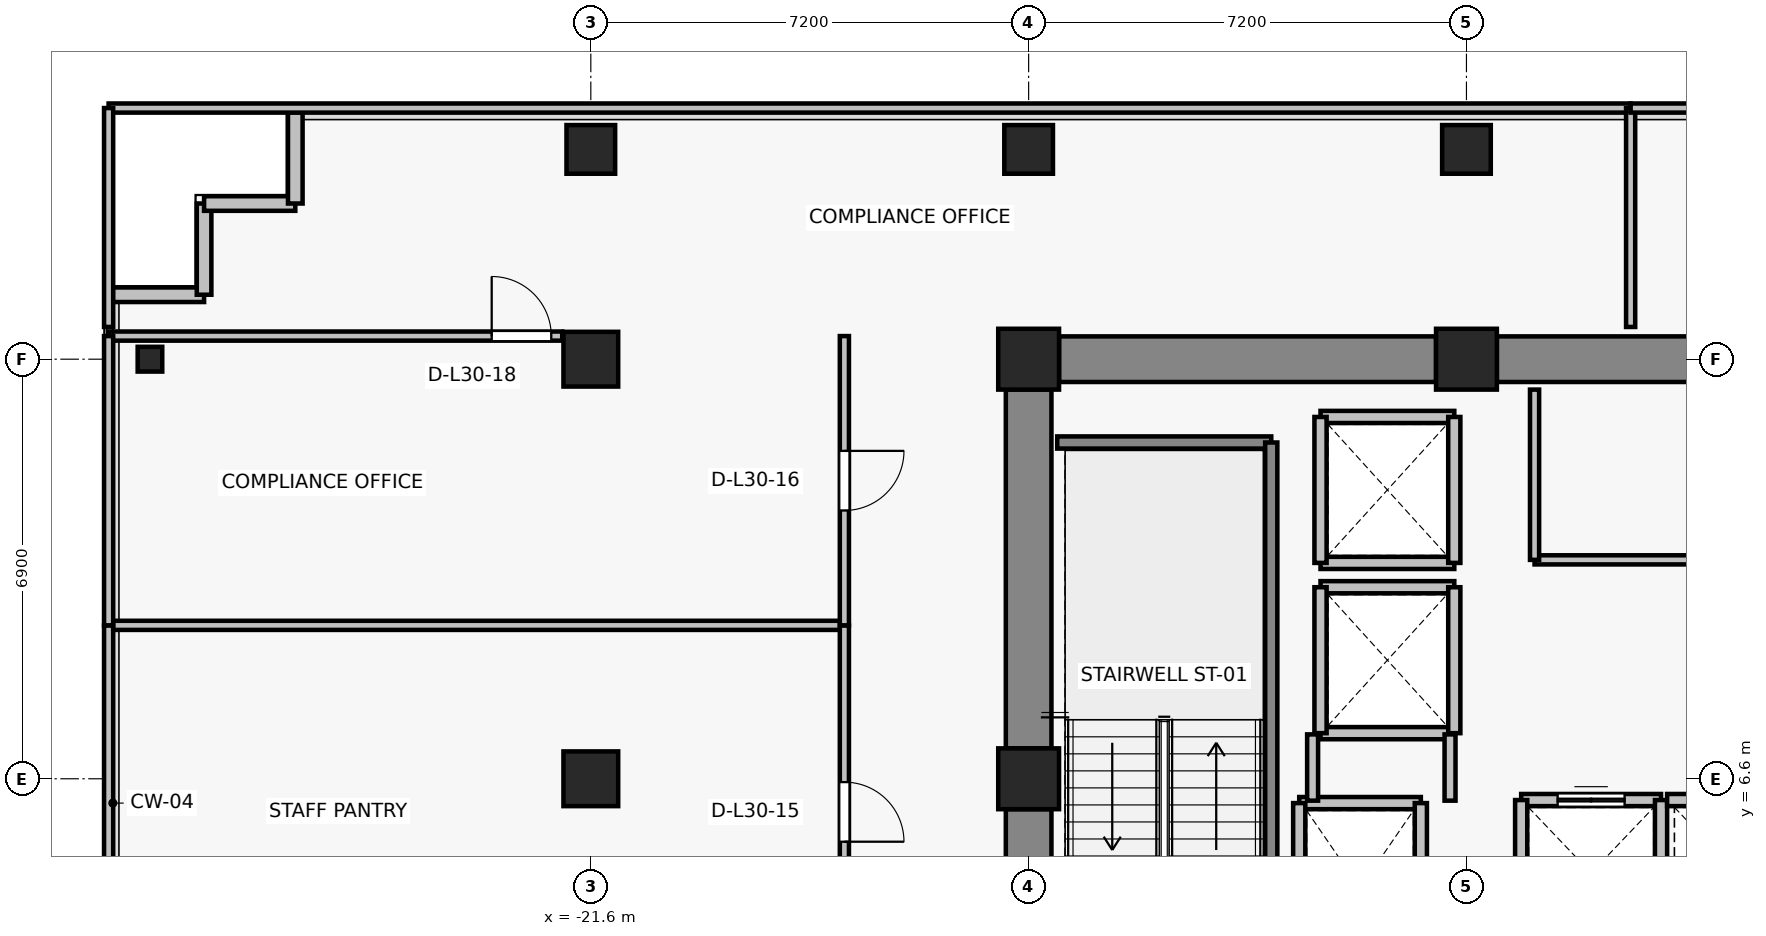
"""IFC4 building model, lengths in metres.
Left out: names, types, materials, properties, quantities, classifications, styles, units other than length and angle.
Written with IfcOpenShell. Run it as: python <this file> out.ifc"""

import sys

from ifc_helpers import new_model, si_unit, direction, frame, frame_2d, origin, origin_2d, place, context, subcontext, project, spatial, rectangle, i_section, extrude, source, transform, mapped, element, fill, save


model = new_model("IFC4")
c1 = context("Model", 3, precision=1e-05, world=origin(), true_north=direction((0.0, 1.0)))
c2 = subcontext(c1, "Body", "Model", "MODEL_VIEW")
j1 = project(units=[si_unit("LENGTHUNIT", "METRE"), si_unit("PLANEANGLEUNIT", "RADIAN")], contexts=[c1])
p1 = place(None, origin())
s1 = spatial("IfcSite", under=j1, at=p1, CompositionType="ELEMENT")
p2 = place(p1, origin())
s2 = spatial("IfcBuilding", under=s1, at=p2, CompositionType="ELEMENT")
p3 = place(p2, frame((0.0, 0.0, 109.9)))
s3 = spatial("IfcBuildingStorey", under=s2, at=p3, CompositionType="ELEMENT", Elevation=109.9)
for number, where, z_axis, x_axis in (
    (1, (-14.4, 6.6, 0.0), (0.0, 0.0, 1.0), (1.0, 0.0, 0.0)),
    (2, (-14.4, 13.5, 0.0), (0.0, 0.0, 1.0), (1.0, 0.0, 0.0)),
    (3, (-7.2, 13.5, 0.0), (0.0, 0.0, 1.0), (1.0, 0.0, 0.0)),
):
    element("IfcColumn", number, at=place(p3, frame(where, z_axis=z_axis, x_axis=x_axis)), inside=s3, PredefinedType="COLUMN", context=c2, shape_type="SweptSolid", body=[
        extrude(rectangle(XDim=1.0, YDim=1.0, at=origin_2d()), origin(), (0.0, 0.0, 1.0), 3.3),
    ])
for number, where, z_axis, x_axis in (
    (4, (-21.6, 6.6, 0.0), (0.0, 0.0, 1.0), (1.0, 0.0, 0.0)),
    (5, (-21.6, 13.5, 0.0), (0.0, 0.0, 1.0), (1.0, 0.0, 0.0)),
):
    element("IfcColumn", number, at=place(p3, frame(where, z_axis=z_axis, x_axis=x_axis)), inside=s3, PredefinedType="COLUMN", context=c2, shape_type="SweptSolid", body=[
        extrude(rectangle(XDim=0.9, YDim=0.9, at=origin_2d()), origin(), (0.0, 0.0, 1.0), 3.3),
    ])
for number, where, z_axis, x_axis in (
    (6, (-14.4, 16.95, 0.0), (0.0, 0.0, 1.0), (1.0, 0.0, 0.0)),
    (7, (-7.2, 16.95, 0.0), (0.0, 0.0, 1.0), (1.0, 0.0, 0.0)),
    (8, (-21.6, 16.95, 0.0), (0.0, 0.0, 1.0), (1.0, 0.0, 0.0)),
):
    element("IfcColumn", number, at=place(p3, frame(where, z_axis=z_axis, x_axis=x_axis)), inside=s3, PredefinedType="COLUMN", context=c2, shape_type="SweptSolid", body=[
        extrude(rectangle(XDim=0.8, YDim=0.8, at=origin_2d()), origin(), (0.0, 0.0, 1.0), 3.3),
    ])
p4 = place(p3, frame((-28.85, 13.5, 0.0), z_axis=(0.0, 0.0, 1.0), x_axis=(1.0, 0.0, 0.0)))
e9 = element("IfcColumn", 9, at=p4, inside=s3, PredefinedType="COLUMN", context=c2, shape_type="SweptSolid", body=[
    extrude(i_section(OverallWidth=0.404, OverallDepth=0.407, WebThickness=0.022, FlangeThickness=0.032, FilletRadius=0.015, at=origin_2d()), origin(), (0.0, 0.0, 1.0), 3.3),
])
p5 = place(p3, frame((-13.9, 13.5, 0.0), z_axis=(0.0, 0.0, 1.0), x_axis=(1.0, 0.0, 0.0)))
e10 = element("IfcWall", 10, at=p5, inside=s3, PredefinedType="SHEAR", context=c2, shape_type="SweptSolid", body=[
    extrude(rectangle(XDim=6.2, YDim=0.75, at=frame_2d((3.1, 0.0))), origin(), (0.0, 0.0, 1.0), 3.075),
])
p6 = place(p3, frame((-6.7, 13.5, 0.0), z_axis=(0.0, 0.0, 1.0), x_axis=(1.0, 0.0, 0.0)))
e11 = element("IfcWall", 11, at=p6, inside=s3, PredefinedType="SHEAR", context=c2, shape_type="SweptSolid", body=[
    extrude(rectangle(XDim=13.4, YDim=0.75, at=frame_2d((6.7, 0.0))), origin(), (0.0, 0.0, 1.0), 3.075),
])
p7 = place(p3, frame((-14.4, -0.7, 0.0), z_axis=(0.0, 0.0, 1.0), x_axis=(0.0, 1.0, 0.0)))
e12 = element("IfcWall", 12, at=p7, inside=s3, PredefinedType="SHEAR", context=c2, shape_type="SweptSolid", body=[
    extrude(rectangle(XDim=6.8, YDim=0.75, at=frame_2d((3.4, 0.0))), origin(), (0.0, 0.0, 1.0), 3.075),
])
p8 = place(p3, frame((-14.4, 7.1, 0.0), z_axis=(0.0, 0.0, 1.0), x_axis=(0.0, 1.0, 0.0)))
e13 = element("IfcWall", 13, at=p8, inside=s3, PredefinedType="SHEAR", context=c2, shape_type="SweptSolid", body=[
    extrude(rectangle(XDim=5.9, YDim=0.75, at=frame_2d((2.95, 0.0))), origin(), (0.0, 0.0, 1.0), 3.075),
])
for number, where, z_axis, x_axis in (
    (14, (-27.96, 14.56, 0.0), (0.0, 0.0, 1.0), (-1.0, 0.0, 0.0)),
    (15, (-27.96, 16.06, 0.0), (0.0, 0.0, 1.0), (0.0, -1.0, 0.0)),
    (16, (-26.46, 16.06, 0.0), (0.0, 0.0, 1.0), (-1.0, 0.0, 0.0)),
    (17, (-26.46, 17.56, 0.0), (0.0, 0.0, 1.0), (0.0, -1.0, 0.0)),
):
    element("IfcWall", number, at=place(p3, frame(where, z_axis=z_axis, x_axis=x_axis)), inside=s3, PredefinedType="SOLIDWALL", context=c2, shape_type="SweptSolid", body=[
        extrude(rectangle(XDim=1.5, YDim=0.24, at=frame_2d((0.75, 0.0))), origin(), (0.0, 0.0, 1.0), 3.075),
    ])
p9 = place(p3, frame((-9.95, 6.2, 0.0), z_axis=(0.0, 0.0, 1.0), x_axis=(1.0, 0.0, 0.0)))
e18 = element("IfcWall", 18, at=p9, inside=s3, PredefinedType="SOLIDWALL", context=c2, shape_type="SweptSolid", body=[
    extrude(rectangle(XDim=2.0, YDim=0.2, at=frame_2d((1.0, 0.0))), origin(), (0.0, 0.0, 1.0), 3.075),
])
for number, where, z_axis, x_axis in (
    (19, (-9.95, 3.4, 0.0), (0.0, 0.0, 1.0), (0.0, 1.0, 0.0)),
    (20, (-7.95, 6.2, 0.0), (0.0, 0.0, 1.0), (0.0, -1.0, 0.0)),
):
    element("IfcWall", number, at=place(p3, frame(where, z_axis=z_axis, x_axis=x_axis)), inside=s3, PredefinedType="SOLIDWALL", context=c2, shape_type="SweptSolid", body=[
        extrude(rectangle(XDim=2.8, YDim=0.2, at=frame_2d((1.4, 0.0))), origin(), (0.0, 0.0, 1.0), 3.075),
    ])
p10 = place(p3, frame((-6.3, 6.25, 0.0), z_axis=(0.0, 0.0, 1.0), x_axis=(1.0, 0.0, 0.0)))
e21 = element("IfcWall", 21, at=p10, inside=s3, PredefinedType="SOLIDWALL", context=c2, shape_type="SweptSolid", body=[
    extrude(rectangle(XDim=2.3, YDim=0.2, at=frame_2d((1.15, 0.0))), origin(), (0.0, 0.0, 1.0), 3.075),
])
p11 = place(p10, frame((0.6, 0.0, 0.0)))
e22 = element("IfcOpeningElement", 22, at=p11, cuts=e21, PredefinedType="OPENING", context=c2, shape_type="SweptSolid", body=[
    extrude(rectangle(XDim=1.1, YDim=2.2, at=frame_2d((0.55, 1.1))), frame((0.0, 0.11, 0.0), z_axis=(0.0, -1.0, 0.0), x_axis=(1.0, 0.0, 0.0)), (0.0, 0.0, 1.0), 0.22),
])
for number, where, z_axis, x_axis in (
    (23, (-6.3, 3.85, 0.0), (0.0, 0.0, 1.0), (0.0, 1.0, 0.0)),
    (24, (-4.0, 6.25, 0.0), (0.0, 0.0, 1.0), (0.0, -1.0, 0.0)),
):
    element("IfcWall", number, at=place(p3, frame(where, z_axis=z_axis, x_axis=x_axis)), inside=s3, PredefinedType="SOLIDWALL", context=c2, shape_type="SweptSolid", body=[
        extrude(rectangle(XDim=2.4, YDim=0.2, at=frame_2d((1.2, 0.0))), origin(), (0.0, 0.0, 1.0), 3.075),
    ])
p12 = place(p3, frame((-3.9, 6.25, 0.0), z_axis=(0.0, 0.0, 1.0), x_axis=(1.0, 0.0, 0.0)))
e25 = element("IfcWall", 25, at=p12, inside=s3, PredefinedType="SOLIDWALL", context=c2, shape_type="SweptSolid", body=[
    extrude(rectangle(XDim=2.3, YDim=0.2, at=frame_2d((1.15, 0.0))), origin(), (0.0, 0.0, 1.0), 3.075),
])
p13 = place(p12, frame((0.6, 0.0, 0.0)))
e26 = element("IfcOpeningElement", 26, at=p13, cuts=e25, PredefinedType="OPENING", context=c2, shape_type="SweptSolid", body=[
    extrude(rectangle(XDim=1.1, YDim=2.2, at=frame_2d((0.55, 1.1))), frame((0.0, 0.11, 0.0), z_axis=(0.0, -1.0, 0.0), x_axis=(1.0, 0.0, 0.0)), (0.0, 0.0, 1.0), 0.22),
])
for number, where, z_axis, x_axis in (
    (27, (-7.4, 7.35, 0.0), (0.0, 0.0, 1.0), (-1.0, 0.0, 0.0)),
    (28, (-9.6, 9.75, 0.0), (0.0, 0.0, 1.0), (1.0, 0.0, 0.0)),
):
    element("IfcWall", number, at=place(p3, frame(where, z_axis=z_axis, x_axis=x_axis)), inside=s3, PredefinedType="SOLIDWALL", context=c2, shape_type="SweptSolid", body=[
        extrude(rectangle(XDim=2.2, YDim=0.2, at=frame_2d((1.1, 0.0))), origin(), (0.0, 0.0, 1.0), 2.515),
    ])
p14 = place(p3, frame((-9.6, 7.35, 0.0), z_axis=(0.0, 0.0, 1.0), x_axis=(0.0, 1.0, 0.0)))
e29 = element("IfcWall", 29, at=p14, inside=s3, PredefinedType="SOLIDWALL", context=c2, shape_type="SweptSolid", body=[
    extrude(rectangle(XDim=2.4, YDim=0.2, at=frame_2d((1.2, 0.0))), origin(), (0.0, 0.0, 1.0), 3.075),
])
p15 = place(p3, frame((-7.4, 9.75, 0.0), z_axis=(0.0, 0.0, 1.0), x_axis=(0.0, -1.0, 0.0)))
e30 = element("IfcWall", 30, at=p15, inside=s3, PredefinedType="SOLIDWALL", context=c2, shape_type="SweptSolid", body=[
    extrude(rectangle(XDim=2.4, YDim=0.2, at=frame_2d((1.2, 0.0))), origin(), (0.0, 0.0, 1.0), 2.515),
])
for number, where, z_axis, x_axis in (
    (31, (-7.4, 10.15, 0.0), (0.0, 0.0, 1.0), (-1.0, 0.0, 0.0)),
    (32, (-9.6, 12.55, 0.0), (0.0, 0.0, 1.0), (1.0, 0.0, 0.0)),
):
    element("IfcWall", number, at=place(p3, frame(where, z_axis=z_axis, x_axis=x_axis)), inside=s3, PredefinedType="SOLIDWALL", context=c2, shape_type="SweptSolid", body=[
        extrude(rectangle(XDim=2.2, YDim=0.2, at=frame_2d((1.1, 0.0))), origin(), (0.0, 0.0, 1.0), 2.515),
    ])
p16 = place(p3, frame((-9.6, 10.15, 0.0), z_axis=(0.0, 0.0, 1.0), x_axis=(0.0, 1.0, 0.0)))
e33 = element("IfcWall", 33, at=p16, inside=s3, PredefinedType="SOLIDWALL", context=c2, shape_type="SweptSolid", body=[
    extrude(rectangle(XDim=2.4, YDim=0.2, at=frame_2d((1.2, 0.0))), origin(), (0.0, 0.0, 1.0), 3.075),
])
p17 = place(p3, frame((-7.4, 12.55, 0.0), z_axis=(0.0, 0.0, 1.0), x_axis=(0.0, -1.0, 0.0)))
e34 = element("IfcWall", 34, at=p17, inside=s3, PredefinedType="SOLIDWALL", context=c2, shape_type="SweptSolid", body=[
    extrude(rectangle(XDim=2.4, YDim=0.2, at=frame_2d((1.2, 0.0))), origin(), (0.0, 0.0, 1.0), 2.515),
])
p18 = place(p3, frame((-13.93, 12.13, 0.0), z_axis=(0.0, 0.0, 1.0), x_axis=(1.0, 0.0, 0.0)))
e35 = element("IfcWall", 35, at=p18, inside=s3, PredefinedType="SOLIDWALL", context=c2, shape_type="SweptSolid", body=[
    extrude(rectangle(XDim=3.52, YDim=0.2, at=frame_2d((1.76, 0.0))), origin(), (0.0, 0.0, 1.0), 3.075),
])
p19 = place(p3, frame((-10.41, 12.13, 0.0), z_axis=(0.0, 0.0, 1.0), x_axis=(0.0, -1.0, 0.0)))
e36 = element("IfcWall", 36, at=p19, inside=s3, PredefinedType="SOLIDWALL", context=c2, shape_type="SweptSolid", body=[
    extrude(rectangle(XDim=8.84, YDim=0.2, at=frame_2d((4.42, 0.0))), origin(), (0.0, 0.0, 1.0), 3.075),
])
p20 = place(p3, frame((-9.73, 6.24, 0.0), z_axis=(0.0, 0.0, 1.0), x_axis=(0.0, 1.0, 0.0)))
e37 = element("IfcWall", 37, at=p20, inside=s3, PredefinedType="PARTITIONING", context=c2, shape_type="SweptSolid", body=[
    extrude(rectangle(XDim=1.09, YDim=0.18, at=frame_2d((0.545, 0.0))), origin(), (0.0, 0.0, 1.0), 3.075),
])
p21 = place(p3, frame((-7.47, 7.33, 0.0), z_axis=(0.0, 0.0, 1.0), x_axis=(0.0, -1.0, 0.0)))
e38 = element("IfcWall", 38, at=p21, inside=s3, PredefinedType="PARTITIONING", context=c2, shape_type="SweptSolid", body=[
    extrude(rectangle(XDim=1.09, YDim=0.18, at=frame_2d((0.545, 0.0))), origin(), (0.0, 0.0, 1.0), 2.515),
])
p22 = place(p3, frame((6.08, 10.2, 0.0), z_axis=(0.0, 0.0, 1.0), x_axis=(-1.0, 0.0, 0.0)))
e39 = element("IfcWall", 39, at=p22, inside=s3, PredefinedType="PARTITIONING", context=c2, shape_type="SweptSolid", body=[
    extrude(rectangle(XDim=12.16, YDim=0.15, at=frame_2d((6.08, 0.0))), origin(), (0.0, 0.0, 1.0), 2.59),
])
p23 = place(p22, frame((7.005, 0.0, 0.0)))
e40 = element("IfcOpeningElement", 40, at=p23, cuts=e39, PredefinedType="OPENING", context=c2, shape_type="SweptSolid", body=[
    extrude(rectangle(XDim=1.15, YDim=2.15, at=frame_2d((0.575, 1.075))), frame((0.0, 0.085, 0.0), z_axis=(0.0, -1.0, 0.0), x_axis=(1.0, 0.0, 0.0)), (0.0, 0.0, 1.0), 0.17),
])
p24 = place(p3, frame((-6.08, 10.2, 0.0), z_axis=(0.0, 0.0, 1.0), x_axis=(0.0, 1.0, 0.0)))
e41 = element("IfcWall", 41, at=p24, inside=s3, PredefinedType="PARTITIONING", context=c2, shape_type="SweptSolid", body=[
    extrude(rectangle(XDim=2.8, YDim=0.15, at=frame_2d((1.4, 0.0))), origin(), (0.0, 0.0, 1.0), 3.075),
])
p25 = place(p3, frame((-29.53, 9.123, 0.0), z_axis=(0.0, 0.0, 1.0), x_axis=(1.0, 0.0, 0.0)))
e42 = element("IfcWall", 42, at=p25, inside=s3, PredefinedType="PARTITIONING", context=c2, shape_type="SweptSolid", body=[
    extrude(rectangle(XDim=12.1, YDim=0.15, at=frame_2d((6.05, 0.0))), origin(), (0.0, 0.0, 1.0), 2.515),
])
p26 = place(p3, frame((-29.53, 2.987, 0.0), z_axis=(0.0, 0.0, 1.0), x_axis=(0.0, 1.0, 0.0)))
e43 = element("IfcWall", 43, at=p26, inside=s3, PredefinedType="PARTITIONING", context=c2, shape_type="SweptSolid", body=[
    extrude(rectangle(XDim=6.136, YDim=0.15, at=frame_2d((3.068, 0.0))), origin(), (0.0, 0.0, 1.0), 3.075),
])
p27 = place(p3, frame((-17.43, 9.123, 0.0), z_axis=(0.0, 0.0, 1.0), x_axis=(0.0, -1.0, 0.0)))
e44 = element("IfcWall", 44, at=p27, inside=s3, PredefinedType="PARTITIONING", context=c2, shape_type="SweptSolid", body=[
    extrude(rectangle(XDim=6.136, YDim=0.15, at=frame_2d((3.068, 0.0))), origin(), (0.0, 0.0, 1.0), 2.515),
])
p28 = place(p27, frame((2.578, 0.0, 0.0)))
e45 = element("IfcOpeningElement", 45, at=p28, cuts=e44, PredefinedType="OPENING", context=c2, shape_type="SweptSolid", body=[
    extrude(rectangle(XDim=0.98, YDim=2.15, at=frame_2d((0.49, 1.075))), frame((0.0, 0.085, 0.0), z_axis=(0.0, -1.0, 0.0), x_axis=(1.0, 0.0, 0.0)), (0.0, 0.0, 1.0), 0.17),
])
p29 = place(p3, frame((-29.53, 13.88, 0.0), z_axis=(0.0, 0.0, 1.0), x_axis=(1.0, 0.0, 0.0)))
e46 = element("IfcWall", 46, at=p29, inside=s3, PredefinedType="PARTITIONING", context=c2, shape_type="SweptSolid", body=[
    extrude(rectangle(XDim=7.46, YDim=0.15, at=frame_2d((3.73, 0.0))), origin(), (0.0, 0.0, 1.0), 3.075),
])
p30 = place(p29, frame((6.3, 0.0, 0.0)))
e47 = element("IfcOpeningElement", 47, at=p30, cuts=e46, PredefinedType="OPENING", context=c2, shape_type="SweptSolid", body=[
    extrude(rectangle(XDim=0.98, YDim=2.15, at=frame_2d((0.49, 1.075))), frame((0.0, 0.085, 0.0), z_axis=(0.0, -1.0, 0.0), x_axis=(1.0, 0.0, 0.0)), (0.0, 0.0, 1.0), 0.17),
])
p31 = place(p3, frame((-29.53, 9.123, 0.0), z_axis=(0.0, 0.0, 1.0), x_axis=(0.0, 1.0, 0.0)))
e48 = element("IfcWall", 48, at=p31, inside=s3, PredefinedType="PARTITIONING", context=c2, shape_type="SweptSolid", body=[
    extrude(rectangle(XDim=4.757, YDim=0.15, at=frame_2d((2.378, 0.0))), origin(), (0.0, 0.0, 1.0), 3.075),
])
p32 = place(p3, frame((-17.43, 13.88, 0.0), z_axis=(0.0, 0.0, 1.0), x_axis=(0.0, -1.0, 0.0)))
e49 = element("IfcWall", 49, at=p32, inside=s3, PredefinedType="PARTITIONING", context=c2, shape_type="SweptSolid", body=[
    extrude(rectangle(XDim=4.757, YDim=0.15, at=frame_2d((2.378, 0.0))), origin(), (0.0, 0.0, 1.0), 2.515),
])
p33 = place(p32, frame((1.888, 0.0, 0.0)))
e50 = element("IfcOpeningElement", 50, at=p33, cuts=e49, PredefinedType="OPENING", context=c2, shape_type="SweptSolid", body=[
    extrude(rectangle(XDim=0.98, YDim=2.15, at=frame_2d((0.49, 1.075))), frame((0.0, 0.085, 0.0), z_axis=(0.0, -1.0, 0.0), x_axis=(1.0, 0.0, 0.0)), (0.0, 0.0, 1.0), 0.17),
])
p34 = place(p3, frame((-29.53, 17.63, 0.0), z_axis=(0.0, 0.0, 1.0), x_axis=(1.0, 0.0, 0.0)))
e51 = element("IfcWall", 51, at=p34, inside=s3, PredefinedType="PARTITIONING", context=c2, shape_type="SweptSolid", body=[
    extrude(rectangle(XDim=25.03, YDim=0.15, at=frame_2d((12.515, 0.0))), origin(), (0.0, 0.0, 1.0), 2.59),
])
p35 = place(p3, frame((-29.53, 14.03, 0.0), z_axis=(0.0, 0.0, 1.0), x_axis=(0.0, 1.0, 0.0)))
e52 = element("IfcWall", 52, at=p35, inside=s3, PredefinedType="PARTITIONING", context=c2, shape_type="SweptSolid", body=[
    extrude(rectangle(XDim=3.6, YDim=0.15, at=frame_2d((1.8, 0.0))), origin(), (0.0, 0.0, 1.0), 3.075),
])
p36 = place(p3, frame((-4.5, 17.63, 0.0), z_axis=(0.0, 0.0, 1.0), x_axis=(0.0, -1.0, 0.0)))
e53 = element("IfcWall", 53, at=p36, inside=s3, PredefinedType="PARTITIONING", context=c2, shape_type="SweptSolid", body=[
    extrude(rectangle(XDim=3.6, YDim=0.15, at=frame_2d((1.8, 0.0))), origin(), (0.0, 0.0, 1.0), 2.565),
])
p37 = place(p3, frame((-4.5, 17.63, 0.0), z_axis=(0.0, 0.0, 1.0), x_axis=(1.0, 0.0, 0.0)))
e54 = element("IfcWall", 54, at=p37, inside=s3, PredefinedType="PARTITIONING", context=c2, shape_type="SweptSolid", body=[
    extrude(rectangle(XDim=30.03, YDim=0.15, at=frame_2d((15.015, 0.0))), origin(), (0.0, 0.0, 1.0), 2.59),
])
m1 = source(origin(), c2, "Body", "SweptSolid", [
    extrude(rectangle(XDim=1.1, YDim=2.2, at=frame_2d((0.55, 1.1))), frame((0.0, 0.025, 0.0), z_axis=(0.0, -1.0, 0.0), x_axis=(1.0, 0.0, 0.0)), (0.0, 0.0, 1.0), 0.05),
])
p38 = place(p11, origin())
e55 = element("IfcDoor", 55, at=p38, inside=s3, OperationType="DOUBLE_DOOR_SLIDING", PredefinedType="DOOR", context=c2, shape_type="MappedRepresentation", body=[
    mapped(m1, transform((0.0, 0.0, 0.0), x_axis=(1.0, 0.0, 0.0), y_axis=(0.0, 1.0, 0.0), z_axis=(0.0, 0.0, 1.0), scale=1.0)),
])
fill(e22, e55)
m2 = source(origin(), c2, "Body", "SweptSolid", [
    extrude(rectangle(XDim=0.98, YDim=2.15, at=frame_2d((0.49, 1.075))), frame((0.0, 0.025, 0.0), z_axis=(0.0, -1.0, 0.0), x_axis=(1.0, 0.0, 0.0)), (0.0, 0.0, 1.0), 0.05),
])
p39 = place(p28, origin())
e56 = element("IfcDoor", 56, at=p39, inside=s3, OperationType="SINGLE_SWING_RIGHT", PredefinedType="DOOR", context=c2, shape_type="MappedRepresentation", body=[
    mapped(m2, transform((0.0, 0.0, 0.0), x_axis=(1.0, 0.0, 0.0), y_axis=(0.0, 1.0, 0.0), z_axis=(0.0, 0.0, 1.0), scale=1.0)),
])
fill(e45, e56)
p40 = place(p33, origin())
e57 = element("IfcDoor", 57, at=p40, inside=s3, OperationType="SINGLE_SWING_LEFT", PredefinedType="DOOR", context=c2, shape_type="MappedRepresentation", body=[
    mapped(m2, transform((0.0, 0.0, 0.0), x_axis=(1.0, 0.0, 0.0), y_axis=(0.0, 1.0, 0.0), z_axis=(0.0, 0.0, 1.0), scale=1.0)),
])
fill(e50, e57)
p41 = place(p30, origin())
e58 = element("IfcDoor", 58, at=p41, inside=s3, OperationType="SINGLE_SWING_LEFT", PredefinedType="DOOR", context=c2, shape_type="MappedRepresentation", body=[
    mapped(m2, transform((0.0, 0.0, 0.0), x_axis=(1.0, 0.0, 0.0), y_axis=(0.0, 1.0, 0.0), z_axis=(0.0, 0.0, 1.0), scale=1.0)),
])
fill(e47, e58)
save(model, sys.argv[1])
